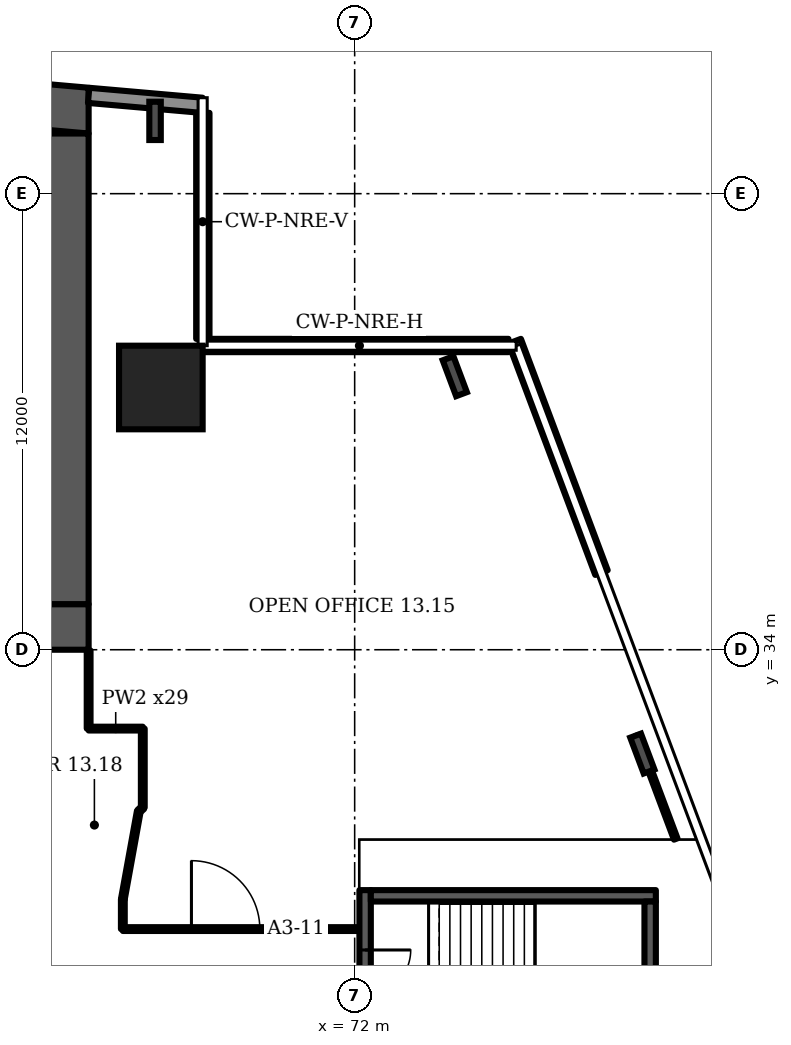
"""IFC4 building model, lengths in metres.
Left out: names, types, materials, properties, quantities, classifications, styles, units other than length and angle.
Written with IfcOpenShell. Run it as: python <this file> out.ifc"""

import sys

from ifc_helpers import new_model, si_unit, direction, frame, frame_2d, origin, origin_2d, place, context, subcontext, project, spatial, polyline, rectangle, i_section, outline, extrude, element, fill, save


model = new_model("IFC4")
c1 = context("Model", 3, precision=1e-05, world=origin(), true_north=direction((0.0, 1.0)))
c2 = subcontext(c1, "Body", "Model", "MODEL_VIEW")
j1 = project(units=[si_unit("LENGTHUNIT", "METRE"), si_unit("PLANEANGLEUNIT", "RADIAN")], contexts=[c1])
p1 = place(None, origin())
s1 = spatial("IfcSite", under=j1, at=p1, CompositionType="ELEMENT")
p2 = place(p1, origin())
s2 = spatial("IfcBuilding", under=s1, at=p2, CompositionType="ELEMENT")
p3 = place(p2, frame((0.0, 0.0, 66.7)))
s3 = spatial("IfcBuildingStorey", under=s2, at=p3, CompositionType="ELEMENT", Elevation=66.7)
p4 = place(p3, origin())
e1 = element("IfcWall", 1, at=p4, inside=s3, PredefinedType="SHEAR", context=c2, shape_type="SweptSolid", body=[
    extrude(outline(polyline([(9.0, 47.583), (37.0, 50.032), (65.0, 47.583), (65.0, 48.787), (37.0, 51.237), (9.0, 48.787), (9.0, 47.583)])), origin(), (0.0, 0.0, 1.0), 3.6),
])
p5 = place(p3, frame((9.0, 34.6, 0.0), z_axis=(0.0, 0.0, 1.0), x_axis=(1.0, 0.0, 0.0)))
e2 = element("IfcWall", 2, at=p5, inside=s3, PredefinedType="SHEAR", context=c2, shape_type="SweptSolid", body=[
    extrude(rectangle(XDim=56.0, YDim=1.2, at=frame_2d((28.0, 0.0))), origin(), (0.0, 0.0, 1.0), 3.6),
])
p6 = place(p5, frame((2.0, 0.0, 0.0)))
e3 = element("IfcOpeningElement", 3, at=p6, cuts=e2, PredefinedType="OPENING", context=c2, shape_type="SweptSolid", body=[
    extrude(rectangle(XDim=1.0, YDim=2.1, at=frame_2d((0.5, 1.05))), frame((0.0, 0.61, 0.0), z_axis=(0.0, -1.0, 0.0), x_axis=(1.0, 0.0, 0.0)), (0.0, 0.0, 1.0), 1.22),
])
p7 = place(p5, frame((4.6, 0.0, 0.0)))
e4 = element("IfcOpeningElement", 4, at=p7, cuts=e2, PredefinedType="OPENING", context=c2, shape_type="SweptSolid", body=[
    extrude(rectangle(XDim=1.0, YDim=2.1, at=frame_2d((0.5, 1.05))), frame((0.0, 0.61, 0.0), z_axis=(0.0, -1.0, 0.0), x_axis=(1.0, 0.0, 0.0)), (0.0, 0.0, 1.0), 1.22),
])
p8 = place(p5, frame((7.867, 0.0, 0.0)))
e5 = element("IfcOpeningElement", 5, at=p8, cuts=e2, PredefinedType="OPENING", context=c2, shape_type="SweptSolid", body=[
    extrude(rectangle(XDim=1.1, YDim=2.1, at=frame_2d((0.55, 1.05))), frame((0.0, 0.61, 0.0), z_axis=(0.0, -1.0, 0.0), x_axis=(1.0, 0.0, 0.0)), (0.0, 0.0, 1.0), 1.22),
])
p9 = place(p5, frame((12.033, 0.0, 0.0)))
e6 = element("IfcOpeningElement", 6, at=p9, cuts=e2, PredefinedType="OPENING", context=c2, shape_type="SweptSolid", body=[
    extrude(rectangle(XDim=1.1, YDim=2.1, at=frame_2d((0.55, 1.05))), frame((0.0, 0.61, 0.0), z_axis=(0.0, -1.0, 0.0), x_axis=(1.0, 0.0, 0.0)), (0.0, 0.0, 1.0), 1.22),
])
p10 = place(p5, frame((9.8, 0.0, 0.0)))
e7 = element("IfcOpeningElement", 7, at=p10, cuts=e2, PredefinedType="OPENING", context=c2, shape_type="SweptSolid", body=[
    extrude(rectangle(XDim=1.4, YDim=2.1, at=frame_2d((0.7, 1.05))), frame((0.0, 0.61, 0.0), z_axis=(0.0, -1.0, 0.0), x_axis=(1.0, 0.0, 0.0)), (0.0, 0.0, 1.0), 1.22),
])
p11 = place(p5, frame((14.65, 0.0, 0.0)))
e8 = element("IfcOpeningElement", 8, at=p11, cuts=e2, PredefinedType="OPENING", context=c2, shape_type="SweptSolid", body=[
    extrude(rectangle(XDim=1.2, YDim=2.1, at=frame_2d((0.6, 1.05))), frame((0.0, 0.61, 0.0), z_axis=(0.0, -1.0, 0.0), x_axis=(1.0, 0.0, 0.0)), (0.0, 0.0, 1.0), 1.22),
])
p12 = place(p5, frame((21.867, 0.0, 0.0)))
e9 = element("IfcOpeningElement", 9, at=p12, cuts=e2, PredefinedType="OPENING", context=c2, shape_type="SweptSolid", body=[
    extrude(rectangle(XDim=1.1, YDim=2.1, at=frame_2d((0.55, 1.05))), frame((0.0, 0.61, 0.0), z_axis=(0.0, -1.0, 0.0), x_axis=(1.0, 0.0, 0.0)), (0.0, 0.0, 1.0), 1.22),
])
p13 = place(p5, frame((26.033, 0.0, 0.0)))
e10 = element("IfcOpeningElement", 10, at=p13, cuts=e2, PredefinedType="OPENING", context=c2, shape_type="SweptSolid", body=[
    extrude(rectangle(XDim=1.1, YDim=2.1, at=frame_2d((0.55, 1.05))), frame((0.0, 0.61, 0.0), z_axis=(0.0, -1.0, 0.0), x_axis=(1.0, 0.0, 0.0)), (0.0, 0.0, 1.0), 1.22),
])
p14 = place(p5, frame((23.8, 0.0, 0.0)))
e11 = element("IfcOpeningElement", 11, at=p14, cuts=e2, PredefinedType="OPENING", context=c2, shape_type="SweptSolid", body=[
    extrude(rectangle(XDim=1.4, YDim=2.1, at=frame_2d((0.7, 1.05))), frame((0.0, 0.61, 0.0), z_axis=(0.0, -1.0, 0.0), x_axis=(1.0, 0.0, 0.0)), (0.0, 0.0, 1.0), 1.22),
])
p15 = place(p5, frame((28.867, 0.0, 0.0)))
e12 = element("IfcOpeningElement", 12, at=p15, cuts=e2, PredefinedType="OPENING", context=c2, shape_type="SweptSolid", body=[
    extrude(rectangle(XDim=1.1, YDim=2.1, at=frame_2d((0.55, 1.05))), frame((0.0, 0.61, 0.0), z_axis=(0.0, -1.0, 0.0), x_axis=(1.0, 0.0, 0.0)), (0.0, 0.0, 1.0), 1.22),
])
p16 = place(p5, frame((33.033, 0.0, 0.0)))
e13 = element("IfcOpeningElement", 13, at=p16, cuts=e2, PredefinedType="OPENING", context=c2, shape_type="SweptSolid", body=[
    extrude(rectangle(XDim=1.1, YDim=2.1, at=frame_2d((0.55, 1.05))), frame((0.0, 0.61, 0.0), z_axis=(0.0, -1.0, 0.0), x_axis=(1.0, 0.0, 0.0)), (0.0, 0.0, 1.0), 1.22),
])
p17 = place(p5, frame((40.15, 0.0, 0.0)))
e14 = element("IfcOpeningElement", 14, at=p17, cuts=e2, PredefinedType="OPENING", context=c2, shape_type="SweptSolid", body=[
    extrude(rectangle(XDim=1.2, YDim=2.1, at=frame_2d((0.6, 1.05))), frame((0.0, 0.61, 0.0), z_axis=(0.0, -1.0, 0.0), x_axis=(1.0, 0.0, 0.0)), (0.0, 0.0, 1.0), 1.22),
])
p18 = place(p5, frame((44.8, 0.0, 0.0)))
e15 = element("IfcOpeningElement", 15, at=p18, cuts=e2, PredefinedType="OPENING", context=c2, shape_type="SweptSolid", body=[
    extrude(rectangle(XDim=1.4, YDim=2.1, at=frame_2d((0.7, 1.05))), frame((0.0, 0.61, 0.0), z_axis=(0.0, -1.0, 0.0), x_axis=(1.0, 0.0, 0.0)), (0.0, 0.0, 1.0), 1.22),
])
p19 = place(p5, frame((49.867, 0.0, 0.0)))
e16 = element("IfcOpeningElement", 16, at=p19, cuts=e2, PredefinedType="OPENING", context=c2, shape_type="SweptSolid", body=[
    extrude(rectangle(XDim=1.1, YDim=2.1, at=frame_2d((0.55, 1.05))), frame((0.0, 0.61, 0.0), z_axis=(0.0, -1.0, 0.0), x_axis=(1.0, 0.0, 0.0)), (0.0, 0.0, 1.0), 1.22),
])
p20 = place(p5, frame((53.5, 0.0, 0.0)))
e17 = element("IfcOpeningElement", 17, at=p20, cuts=e2, PredefinedType="OPENING", context=c2, shape_type="SweptSolid", body=[
    extrude(rectangle(XDim=1.1, YDim=2.1, at=frame_2d((0.55, 1.05))), frame((0.0, 0.61, 0.0), z_axis=(0.0, -1.0, 0.0), x_axis=(1.0, 0.0, 0.0)), (0.0, 0.0, 1.0), 1.22),
])
p21 = place(p5, frame((51.567, 0.0, 0.0)))
e18 = element("IfcOpeningElement", 18, at=p21, cuts=e2, PredefinedType="OPENING", context=c2, shape_type="SweptSolid", body=[
    extrude(rectangle(XDim=1.4, YDim=2.1, at=frame_2d((0.7, 1.05))), frame((0.0, 0.61, 0.0), z_axis=(0.0, -1.0, 0.0), x_axis=(1.0, 0.0, 0.0)), (0.0, 0.0, 1.0), 1.22),
])
p22 = place(p3, frame((64.4, 35.2, 0.0), z_axis=(0.0, 0.0, 1.0), x_axis=(0.0, 1.0, 0.0)))
e19 = element("IfcWall", 19, at=p22, inside=s3, PredefinedType="SHEAR", context=c2, shape_type="SweptSolid", body=[
    extrude(rectangle(XDim=12.383, YDim=1.2, at=frame_2d((6.191, 0.0))), origin(), (0.0, 0.0, 1.0), 3.6),
])
p23 = place(p3, frame((66.9, 40.9, 0.0), z_axis=(0.0, 0.0, 1.0), x_axis=(1.0, 0.0, 0.0)))
e20 = element("IfcColumn", 20, at=p23, inside=s3, PredefinedType="COLUMN", context=c2, shape_type="SweptSolid", body=[
    extrude(rectangle(XDim=2.2, YDim=2.2, at=origin_2d()), origin(), (0.0, 0.0, 1.0), 3.6),
])
for number, where, z_axis, x_axis in (
    (21, (79.57, 31.268, 0.0), (0.0, 0.0, 1.0), (0.936, 0.351, 0.0)),
    (22, (74.634, 41.196, 0.0), (0.0, 0.0, 1.0), (0.936, 0.351, 0.0)),
    (23, (66.748, 47.915, 0.0), (0.0, 0.0, 1.0), (1.0, 0.0, 0.0)),
):
    element("IfcColumn", number, at=place(p3, frame(where, z_axis=z_axis, x_axis=x_axis)), inside=s3, PredefinedType="COLUMN", context=c2, shape_type="SweptSolid", body=[
        extrude(i_section(OverallWidth=0.302, OverallDepth=1.008, WebThickness=0.021, FlangeThickness=0.04, FilletRadius=0.03, at=origin_2d()), origin(), (0.0, 0.0, 1.0), 3.6),
    ])
p24 = place(p3, frame((67.983, 48.326, 0.0), z_axis=(0.0, 0.0, 1.0), x_axis=(-0.996194, 0.087168, 0.0)))
e24 = element("IfcWall", 24, at=p24, inside=s3, PredefinedType="SOLIDWALL", context=c2, shape_type="SweptSolid", body=[
    extrude(rectangle(XDim=2.994, YDim=0.4, at=frame_2d((1.497, 0.0))), origin(), (0.0, 0.0, 1.0), 3.2),
])
p25 = place(p3, frame((78.494, 36.03, 0.0), z_axis=(0.0, 0.0, 1.0), x_axis=(-0.351108, 0.936338, 0.0)))
e25 = element("IfcWall", 25, at=p25, inside=s3, PredefinedType="SOLIDWALL", context=c2, shape_type="SweptSolid", body=[
    extrude(rectangle(XDim=6.503, YDim=0.35, at=frame_2d((3.251, 0.0))), origin(), (0.0, 0.0, 1.0), 1.0),
])
p26 = place(p3, frame((76.047, 42.005, 0.0), z_axis=(0.0, 0.0, 1.0), x_axis=(-1.0, 0.0, 0.0)))
e26 = element("IfcWall", 26, at=p26, inside=s3, PredefinedType="SOLIDWALL", context=c2, shape_type="SweptSolid", body=[
    extrude(rectangle(XDim=8.047, YDim=0.35, at=frame_2d((4.023, 0.0))), origin(), (0.0, 0.0, 1.0), 1.0),
])
p27 = place(p3, frame((68.005, 42.18, 0.0), z_axis=(0.0, 0.0, 1.0), x_axis=(0.0, 1.0, 0.0)))
e27 = element("IfcWall", 27, at=p27, inside=s3, PredefinedType="SOLIDWALL", context=c2, shape_type="SweptSolid", body=[
    extrude(rectangle(XDim=5.947, YDim=0.35, at=frame_2d((2.973, 0.0))), origin(), (0.0, 0.0, 1.0), 1.0),
])
p28 = place(p3, frame((72.275, 23.325, 0.0), z_axis=(0.0, 0.0, 1.0), x_axis=(0.0, 1.0, 0.0)))
e28 = element("IfcWall", 28, at=p28, inside=s3, PredefinedType="SHEAR", context=c2, shape_type="SweptSolid", body=[
    extrude(rectangle(XDim=4.35, YDim=0.3, at=frame_2d((2.175, 0.0))), origin(), (0.0, 0.0, 1.0), 3.2),
])
p29 = place(p28, frame((1.575, 0.0, 0.0)))
e29 = element("IfcOpeningElement", 29, at=p29, cuts=e28, PredefinedType="OPENING", context=c2, shape_type="SweptSolid", body=[
    extrude(rectangle(XDim=1.2, YDim=2.1, at=frame_2d((0.6, 1.05))), frame((0.0, 0.16, 0.0), z_axis=(0.0, -1.0, 0.0), x_axis=(1.0, 0.0, 0.0)), (0.0, 0.0, 1.0), 0.32),
])
p30 = place(p3, frame((65.0, 31.925, 0.0), z_axis=(0.0, 0.0, 1.0), x_axis=(0.0, 1.0, 0.0)))
e30 = element("IfcWall", 30, at=p30, inside=s3, PredefinedType="PARTITIONING", context=c2, shape_type="SweptSolid", body=[
    extrude(rectangle(XDim=2.055, YDim=0.1, at=frame_2d((1.027, 0.0))), origin(), (0.0, 0.0, 1.0), 3.2),
])
p31 = place(p3, frame((65.0, 31.925, 0.0), z_axis=(0.0, 0.0, 1.0), x_axis=(1.0, 0.0, 0.0)))
e31 = element("IfcWall", 31, at=p31, inside=s3, PredefinedType="PARTITIONING", context=c2, shape_type="SweptSolid", body=[
    extrude(rectangle(XDim=1.425, YDim=0.1, at=frame_2d((0.712, 0.0))), origin(), (0.0, 0.0, 1.0), 3.2),
])
p32 = place(p3, frame((65.9, 26.65, 0.0), z_axis=(0.0, 0.0, 1.0), x_axis=(0.0, 1.0, 0.0)))
e32 = element("IfcWall", 32, at=p32, inside=s3, PredefinedType="PARTITIONING", context=c2, shape_type="SweptSolid", body=[
    extrude(rectangle(XDim=0.785, YDim=0.1, at=frame_2d((0.393, 0.0))), origin(), (0.0, 0.0, 1.0), 3.2),
])
p33 = place(p3, frame((65.9, 26.65, 0.0), z_axis=(0.0, 0.0, 1.0), x_axis=(1.0, 0.0, 0.0)))
e33 = element("IfcWall", 33, at=p33, inside=s3, PredefinedType="PARTITIONING", context=c2, shape_type="SweptSolid", body=[
    extrude(rectangle(XDim=6.205, YDim=0.1, at=frame_2d((3.103, 0.0))), origin(), (0.0, 0.0, 1.0), 3.2),
])
p34 = place(p33, frame((1.805, 0.0, 0.0)))
e34 = element("IfcOpeningElement", 34, at=p34, cuts=e33, PredefinedType="OPENING", context=c2, shape_type="SweptSolid", body=[
    extrude(rectangle(XDim=1.8, YDim=2.1, at=frame_2d((0.9, 1.05))), frame((0.0, 0.06, 0.0), z_axis=(0.0, -1.0, 0.0), x_axis=(1.0, 0.0, 0.0)), (0.0, 0.0, 1.0), 0.12),
])
p35 = place(p3, frame((65.9, 27.435, 0.0), z_axis=(0.0, 0.0, 1.0), x_axis=(0.178584, 0.983924, 0.0)))
e35 = element("IfcWall", 35, at=p35, inside=s3, PredefinedType="PARTITIONING", context=c2, shape_type="SweptSolid", body=[
    extrude(rectangle(XDim=2.353, YDim=0.1, at=frame_2d((1.176, 0.0))), origin(), (0.0, 0.0, 1.0), 3.2),
])
p36 = place(p3, frame((66.32, 29.75, 0.0), z_axis=(0.0, 0.0, 1.0), x_axis=(0.741581, 0.670872, 0.0)))
e36 = element("IfcWall", 36, at=p36, inside=s3, PredefinedType="PARTITIONING", context=c2, shape_type="SweptSolid", body=[
    extrude(rectangle(XDim=0.142, YDim=0.1, at=frame_2d((0.071, 0.0))), origin(), (0.0, 0.0, 1.0), 3.2),
])
p37 = place(p3, frame((66.425, 29.845, 0.0), z_axis=(0.0, 0.0, 1.0), x_axis=(0.0, 1.0, 0.0)))
e37 = element("IfcWall", 37, at=p37, inside=s3, PredefinedType="PARTITIONING", context=c2, shape_type="SweptSolid", body=[
    extrude(rectangle(XDim=2.08, YDim=0.1, at=frame_2d((1.04, 0.0))), origin(), (0.0, 0.0, 1.0), 3.2),
])
p38 = place(p3, frame((80.448, 29.02, 0.0), z_axis=(0.0, 0.0, 1.0), x_axis=(-0.35129, 0.93627, 0.0)))
e38 = element("IfcWall", 38, at=p38, inside=s3, PredefinedType="PARTITIONING", context=c2, shape_type="SweptSolid", body=[
    extrude(rectangle(XDim=2.911, YDim=0.1, at=frame_2d((1.455, 0.0))), origin(), (0.0, 0.0, 1.0), 2.58),
])
p39 = place(p3, frame((72.425, 27.525, 0.0), z_axis=(0.0, 0.0, 1.0), x_axis=(1.0, 0.0, 0.0)))
e39 = element("IfcWall", 39, at=p39, inside=s3, PredefinedType="SHEAR", context=c2, shape_type="SweptSolid", body=[
    extrude(rectangle(XDim=7.5, YDim=0.3, at=frame_2d((3.75, 0.0))), origin(), (0.0, 0.0, 1.0), 3.2),
])
p40 = place(p3, frame((79.775, 23.625, 0.0), z_axis=(0.0, 0.0, 1.0), x_axis=(0.0, 1.0, 0.0)))
e40 = element("IfcWall", 40, at=p40, inside=s3, PredefinedType="SHEAR", context=c2, shape_type="SweptSolid", body=[
    extrude(rectangle(XDim=3.75, YDim=0.3, at=frame_2d((1.875, 0.0))), origin(), (0.0, 0.0, 1.0), 3.2),
])
p41 = place(p29, origin())
e41 = element("IfcDoor", 41, at=p41, inside=s3, OperationType="SINGLE_SWING_RIGHT", PredefinedType="DOOR", context=c2, shape_type="SweptSolid", body=[
    extrude(rectangle(XDim=1.2, YDim=2.1, at=frame_2d((0.6, 1.05))), frame((0.0, 0.025, 0.0), z_axis=(0.0, -1.0, 0.0), x_axis=(1.0, 0.0, 0.0)), (0.0, 0.0, 1.0), 0.05),
])
fill(e29, e41)
p42 = place(p34, origin())
e42 = element("IfcDoor", 42, at=p42, inside=s3, OperationType="DOUBLE_DOOR_SINGLE_SWING", PredefinedType="DOOR", context=c2, shape_type="SweptSolid", body=[
    extrude(rectangle(XDim=1.8, YDim=2.1, at=frame_2d((0.9, 1.05))), frame((0.0, 0.025, 0.0), z_axis=(0.0, -1.0, 0.0), x_axis=(1.0, 0.0, 0.0)), (0.0, 0.0, 1.0), 0.05),
])
fill(e34, e42)
save(model, sys.argv[1])
